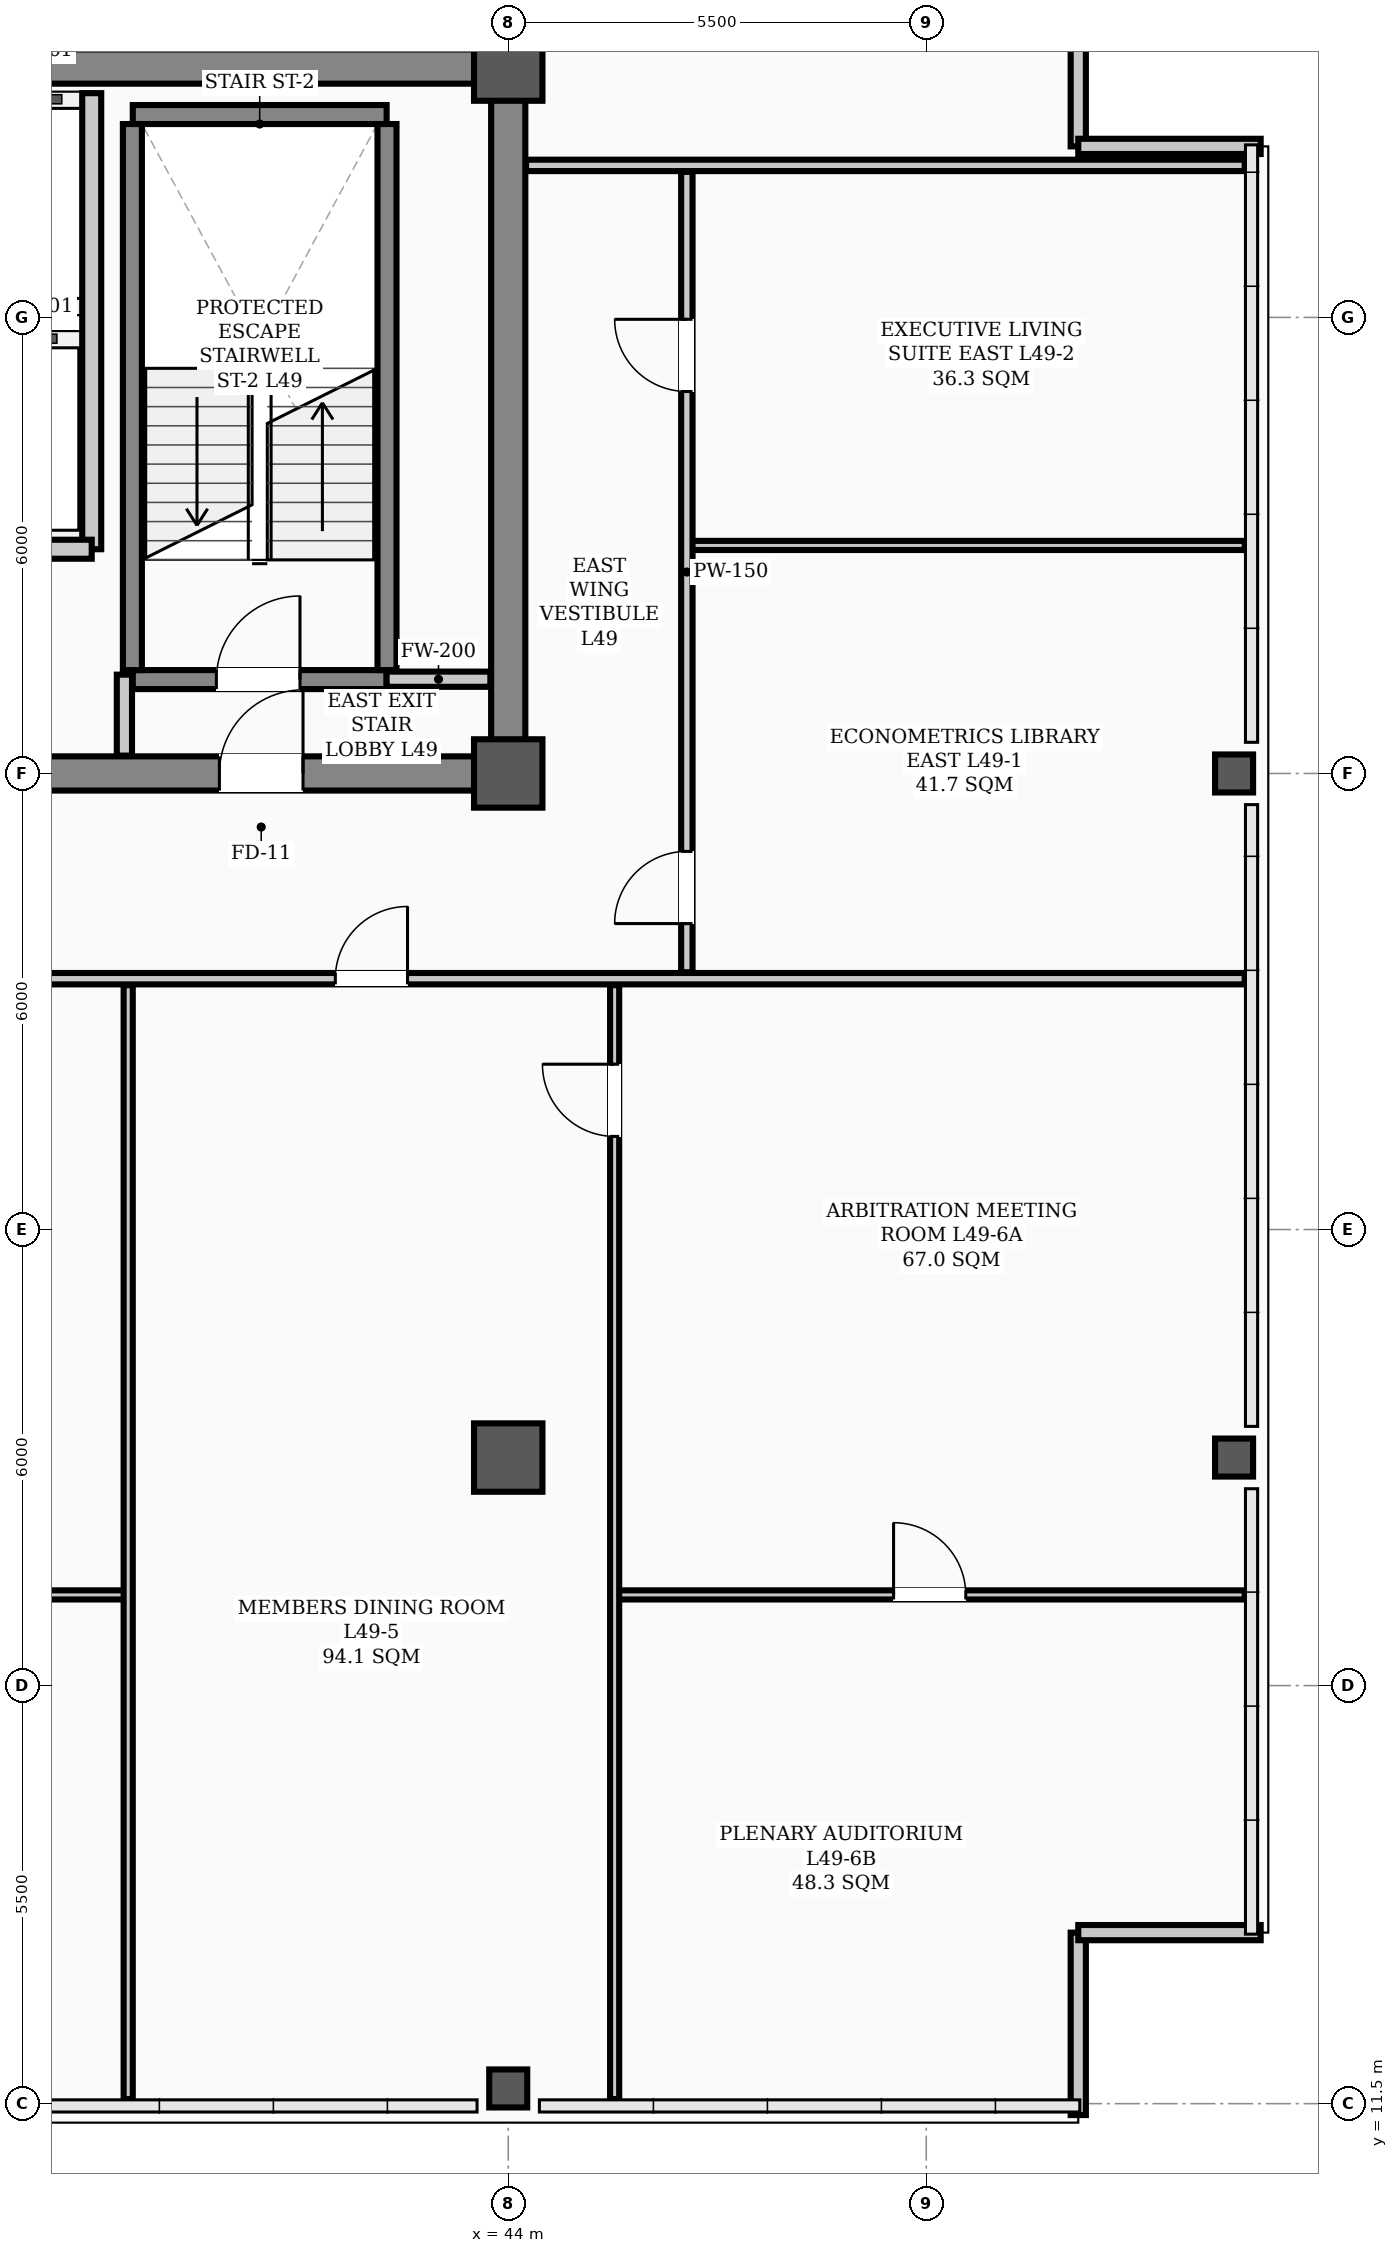
"""IFC4 building model, lengths in metres.
Left out: names, types, materials, properties, quantities, classifications, styles, units other than length and angle.
Written with IfcOpenShell. Run it as: python <this file> out.ifc"""

import sys

from ifc_helpers import new_model, si_unit, direction, frame, frame_2d, origin, origin_2d, place, context, subcontext, project, spatial, rectangle, hollow_rectangle, extrude, element, fill, save


model = new_model("IFC4")
c1 = context("Model", 3, precision=1e-05, world=origin(), true_north=direction((0.0, 1.0)))
c2 = subcontext(c1, "Body", "Model", "MODEL_VIEW")
j1 = project(units=[si_unit("LENGTHUNIT", "METRE"), si_unit("PLANEANGLEUNIT", "RADIAN")], contexts=[c1])
p1 = place(None, origin())
s1 = spatial("IfcSite", under=j1, at=p1, CompositionType="ELEMENT")
p2 = place(p1, origin())
s2 = spatial("IfcBuilding", under=s1, at=p2, CompositionType="ELEMENT")
p3 = place(p2, frame((0.0, 0.0, 196.8)))
s3 = spatial("IfcBuildingStorey", under=s2, at=p3, CompositionType="ELEMENT", Elevation=196.8)
for number, where, z_axis, x_axis in (
    (1, (44.0, 29.0, 0.0), (0.0, 0.0, 1.0), (1.0, 0.0, 0.0)),
    (2, (44.0, 38.3, 0.0), (0.0, 0.0, 1.0), (1.0, 0.0, 0.0)),
    (3, (44.0, 20.0, 0.0), (0.0, 0.0, 1.0), (1.0, 0.0, 0.0)),
):
    element("IfcColumn", number, at=place(p3, frame(where, z_axis=z_axis, x_axis=x_axis)), inside=s3, PredefinedType="COLUMN", context=c2, shape_type="SweptSolid", body=[
        extrude(hollow_rectangle(XDim=0.9, YDim=0.9, WallThickness=0.035, InnerFilletRadius=0.017, OuterFilletRadius=0.052, at=origin_2d()), origin(), (0.0, 0.0, 1.0), 3.9),
    ])
for number, where, z_axis, x_axis in (
    (4, (44.0, 11.7, 0.0), (0.0, 0.0, 1.0), (1.0, 0.0, 0.0)),
    (5, (53.55, 20.0, 0.0), (0.0, 0.0, 1.0), (1.0, 0.0, 0.0)),
    (6, (53.55, 29.0, 0.0), (0.0, 0.0, 1.0), (1.0, 0.0, 0.0)),
):
    element("IfcColumn", number, at=place(p3, frame(where, z_axis=z_axis, x_axis=x_axis)), inside=s3, PredefinedType="COLUMN", context=c2, shape_type="SweptSolid", body=[
        extrude(hollow_rectangle(XDim=0.5, YDim=0.5, WallThickness=0.024, InnerFilletRadius=0.012, OuterFilletRadius=0.036, at=origin_2d()), origin(), (0.0, 0.0, 1.0), 3.9),
    ])
for number, where, z_axis, x_axis in (
    (7, (51.5, 11.35, 0.0), (0.0, 0.0, 1.0), (0.0, 1.0, 0.0)),
    (8, (51.5, 13.75, 0.0), (0.0, 0.0, 1.0), (1.0, 0.0, 0.0)),
    (9, (51.5, 39.65, 0.0), (0.0, 0.0, 1.0), (0.0, -1.0, 0.0)),
    (10, (51.5, 37.25, 0.0), (0.0, 0.0, 1.0), (1.0, 0.0, 0.0)),
):
    element("IfcWall", number, at=place(p3, frame(where, z_axis=z_axis, x_axis=x_axis)), inside=s3, PredefinedType="PARAPET", context=c2, shape_type="SweptSolid", body=[
        extrude(rectangle(XDim=2.4, YDim=0.2, at=frame_2d((1.2, 0.0))), origin(), (0.0, 0.0, 1.0), 1.2),
    ])
p4 = place(p3, frame((13.5, 29.0, 0.0), z_axis=(0.0, 0.0, 1.0), x_axis=(1.0, 0.0, 0.0)))
e11 = element("IfcWall", 11, at=p4, inside=s3, PredefinedType="SHEAR", context=c2, shape_type="SweptSolid", body=[
    extrude(rectangle(XDim=30.5, YDim=0.45, at=frame_2d((15.25, 0.0))), origin(), (0.0, 0.0, 1.0), 3.6),
])
p5 = place(p4, frame((1.75, 0.0, 0.0)))
e12 = element("IfcOpeningElement", 12, at=p5, cuts=e11, PredefinedType="OPENING", context=c2, shape_type="SweptSolid", body=[
    extrude(rectangle(XDim=1.1, YDim=2.08, at=frame_2d((0.55, 1.04))), frame((0.0, 0.235, 0.0), z_axis=(0.0, -1.0, 0.0), x_axis=(1.0, 0.0, 0.0)), (0.0, 0.0, 1.0), 0.47),
])
p6 = place(p4, frame((26.7, 0.0, 0.0)))
e13 = element("IfcOpeningElement", 13, at=p6, cuts=e11, PredefinedType="OPENING", context=c2, shape_type="SweptSolid", body=[
    extrude(rectangle(XDim=1.1, YDim=2.08, at=frame_2d((0.55, 1.04))), frame((0.0, 0.235, 0.0), z_axis=(0.0, -1.0, 0.0), x_axis=(1.0, 0.0, 0.0)), (0.0, 0.0, 1.0), 0.47),
])
p7 = place(p4, frame((6.8, 0.0, 0.0)))
e14 = element("IfcOpeningElement", 14, at=p7, cuts=e11, PredefinedType="OPENING", context=c2, shape_type="SweptSolid", body=[
    extrude(rectangle(XDim=1.1, YDim=2.08, at=frame_2d((0.55, 1.04))), frame((0.0, 0.235, 0.0), z_axis=(0.0, -1.0, 0.0), x_axis=(1.0, 0.0, 0.0)), (0.0, 0.0, 1.0), 0.47),
])
p8 = place(p4, frame((13.2, 0.0, 0.0)))
e15 = element("IfcOpeningElement", 15, at=p8, cuts=e11, PredefinedType="OPENING", context=c2, shape_type="SweptSolid", body=[
    extrude(rectangle(XDim=1.6, YDim=2.08, at=frame_2d((0.8, 1.04))), frame((0.0, 0.235, 0.0), z_axis=(0.0, -1.0, 0.0), x_axis=(1.0, 0.0, 0.0)), (0.0, 0.0, 1.0), 0.47),
])
p9 = place(p4, frame((19.5, 0.0, 0.0)))
e16 = element("IfcOpeningElement", 16, at=p9, cuts=e11, PredefinedType="OPENING", context=c2, shape_type="SweptSolid", body=[
    extrude(rectangle(XDim=0.9, YDim=2.08, at=frame_2d((0.45, 1.04))), frame((0.0, 0.235, 0.0), z_axis=(0.0, -1.0, 0.0), x_axis=(1.0, 0.0, 0.0)), (0.0, 0.0, 1.0), 0.47),
])
p10 = place(p4, frame((21.55, 0.0, 0.0)))
e17 = element("IfcOpeningElement", 17, at=p10, cuts=e11, PredefinedType="OPENING", context=c2, shape_type="SweptSolid", body=[
    extrude(rectangle(XDim=0.9, YDim=2.08, at=frame_2d((0.45, 1.04))), frame((0.0, 0.235, 0.0), z_axis=(0.0, -1.0, 0.0), x_axis=(1.0, 0.0, 0.0)), (0.0, 0.0, 1.0), 0.47),
])
p11 = place(p3, frame((13.5, 38.3, 0.0), z_axis=(0.0, 0.0, 1.0), x_axis=(1.0, 0.0, 0.0)))
e18 = element("IfcWall", 18, at=p11, inside=s3, PredefinedType="SHEAR", context=c2, shape_type="SweptSolid", body=[
    extrude(rectangle(XDim=30.5, YDim=0.45, at=frame_2d((15.25, 0.0))), origin(), (0.0, 0.0, 1.0), 3.6),
])
p12 = place(p3, frame((44.0, 29.35, 0.0), z_axis=(0.0, 0.0, 1.0), x_axis=(0.0, 1.0, 0.0)))
e19 = element("IfcWall", 19, at=p12, inside=s3, PredefinedType="SHEAR", context=c2, shape_type="SweptSolid", body=[
    extrude(rectangle(XDim=8.6, YDim=0.45, at=frame_2d((4.3, 0.0))), origin(), (0.0, 0.0, 1.0), 3.6),
])
p13 = place(p3, frame((39.06, 30.235, 0.0), z_axis=(0.0, 0.0, 1.0), x_axis=(1.0, 0.0, 0.0)))
e20 = element("IfcWall", 20, at=p13, inside=s3, PredefinedType="STANDARD", context=c2, shape_type="SweptSolid", body=[
    extrude(rectangle(XDim=3.34, YDim=0.25, at=frame_2d((1.67, 0.0))), origin(), (0.0, 0.0, 1.0), 3.6),
])
p14 = place(p13, frame((1.1, 0.0, 0.0)))
e21 = element("IfcOpeningElement", 21, at=p14, cuts=e20, PredefinedType="OPENING", context=c2, shape_type="SweptSolid", body=[
    extrude(rectangle(XDim=1.1, YDim=2.08, at=frame_2d((0.55, 1.04))), frame((0.0, 0.135, 0.0), z_axis=(0.0, -1.0, 0.0), x_axis=(1.0, 0.0, 0.0)), (0.0, 0.0, 1.0), 0.27),
])
p15 = place(p3, frame((39.06, 37.669, 0.0), z_axis=(0.0, 0.0, 1.0), x_axis=(1.0, 0.0, 0.0)))
e22 = element("IfcWall", 22, at=p15, inside=s3, PredefinedType="STANDARD", context=c2, shape_type="SweptSolid", body=[
    extrude(rectangle(XDim=3.34, YDim=0.25, at=frame_2d((1.67, 0.0))), origin(), (0.0, 0.0, 1.0), 3.6),
])
for number, where, z_axis, x_axis in (
    (23, (39.055, 30.36, 0.0), (0.0, 0.0, 1.0), (0.0, 1.0, 0.0)),
    (24, (42.405, 30.36, 0.0), (0.0, 0.0, 1.0), (0.0, 1.0, 0.0)),
):
    element("IfcWall", number, at=place(p3, frame(where, z_axis=z_axis, x_axis=x_axis)), inside=s3, PredefinedType="STANDARD", context=c2, shape_type="SweptSolid", body=[
        extrude(rectangle(XDim=7.184, YDim=0.25, at=frame_2d((3.592, 0.0))), origin(), (0.0, 0.0, 1.0), 3.6),
    ])
p16 = place(p3, frame((38.52, 31.95, 0.0), z_axis=(0.0, 0.0, 1.0), x_axis=(0.0, 1.0, 0.0)))
e25 = element("IfcWall", 25, at=p16, inside=s3, PredefinedType="STANDARD", context=c2, shape_type="SweptSolid", body=[
    extrude(rectangle(XDim=6.0, YDim=0.25, at=frame_2d((3.0, 0.0))), origin(), (0.0, 0.0, 1.0), 2.18),
])
p17 = place(p3, frame((36.62, 31.95, 0.0), z_axis=(0.0, 0.0, 1.0), x_axis=(1.0, 0.0, 0.0)))
e26 = element("IfcWall", 26, at=p17, inside=s3, PredefinedType="STANDARD", context=c2, shape_type="SweptSolid", body=[
    extrude(rectangle(XDim=1.9, YDim=0.25, at=frame_2d((0.95, 0.0))), origin(), (0.0, 0.0, 1.0), 3.48),
])
p18 = place(p3, frame((42.4, 30.24, 0.0), z_axis=(0.0, 0.0, 1.0), x_axis=(1.0, 0.0, 0.0)))
e27 = element("IfcWall", 27, at=p18, inside=s3, PredefinedType="STANDARD", context=c2, shape_type="SweptSolid", body=[
    extrude(rectangle(XDim=1.365, YDim=0.2, at=frame_2d((0.683, 0.0))), origin(), (0.0, 0.0, 1.0), 2.18),
])
p19 = place(p3, frame((10.31, 26.3, 0.0), z_axis=(0.0, 0.0, 1.0), x_axis=(1.0, 0.0, 0.0)))
e28 = element("IfcWall", 28, at=p19, inside=s3, PredefinedType="PARTITIONING", context=c2, shape_type="SweptSolid", body=[
    extrude(rectangle(XDim=43.38, YDim=0.15, at=frame_2d((21.69, 0.0))), origin(), (0.0, 0.0, 1.0), 2.18),
])
p20 = place(p19, frame((4.47, 0.0, 0.0)))
e29 = element("IfcOpeningElement", 29, at=p20, cuts=e28, PredefinedType="OPENING", context=c2, shape_type="SweptSolid", body=[
    extrude(rectangle(XDim=0.95, YDim=2.08, at=frame_2d((0.475, 1.04))), frame((0.0, 0.085, 0.0), z_axis=(0.0, -1.0, 0.0), x_axis=(1.0, 0.0, 0.0)), (0.0, 0.0, 1.0), 0.17),
])
p21 = place(p19, frame((10.815, 0.0, 0.0)))
e30 = element("IfcOpeningElement", 30, at=p21, cuts=e28, PredefinedType="OPENING", context=c2, shape_type="SweptSolid", body=[
    extrude(rectangle(XDim=0.95, YDim=2.08, at=frame_2d((0.475, 1.04))), frame((0.0, 0.085, 0.0), z_axis=(0.0, -1.0, 0.0), x_axis=(1.0, 0.0, 0.0)), (0.0, 0.0, 1.0), 0.17),
])
p22 = place(p19, frame((17.715, 0.0, 0.0)))
e31 = element("IfcOpeningElement", 31, at=p22, cuts=e28, PredefinedType="OPENING", context=c2, shape_type="SweptSolid", body=[
    extrude(rectangle(XDim=0.95, YDim=2.08, at=frame_2d((0.475, 1.04))), frame((0.0, 0.085, 0.0), z_axis=(0.0, -1.0, 0.0), x_axis=(1.0, 0.0, 0.0)), (0.0, 0.0, 1.0), 0.17),
])
p23 = place(p19, frame((24.815, 0.0, 0.0)))
e32 = element("IfcOpeningElement", 32, at=p23, cuts=e28, PredefinedType="OPENING", context=c2, shape_type="SweptSolid", body=[
    extrude(rectangle(XDim=0.95, YDim=2.08, at=frame_2d((0.475, 1.04))), frame((0.0, 0.085, 0.0), z_axis=(0.0, -1.0, 0.0), x_axis=(1.0, 0.0, 0.0)), (0.0, 0.0, 1.0), 0.17),
])
p24 = place(p19, frame((31.415, 0.0, 0.0)))
e33 = element("IfcOpeningElement", 33, at=p24, cuts=e28, PredefinedType="OPENING", context=c2, shape_type="SweptSolid", body=[
    extrude(rectangle(XDim=0.95, YDim=2.08, at=frame_2d((0.475, 1.04))), frame((0.0, 0.085, 0.0), z_axis=(0.0, -1.0, 0.0), x_axis=(1.0, 0.0, 0.0)), (0.0, 0.0, 1.0), 0.17),
])
p25 = place(p3, frame((44.235, 37.0, 0.0), z_axis=(0.0, 0.0, 1.0), x_axis=(1.0, 0.0, 0.0)))
e34 = element("IfcWall", 34, at=p25, inside=s3, PredefinedType="PARTITIONING", context=c2, shape_type="SweptSolid", body=[
    extrude(rectangle(XDim=9.455, YDim=0.15, at=frame_2d((4.728, 0.0))), origin(), (0.0, 0.0, 1.0), 2.18),
])
p26 = place(p3, frame((32.2, 18.193, 0.0), z_axis=(0.0, 0.0, 1.0), x_axis=(1.0, 0.0, 0.0)))
e35 = element("IfcWall", 35, at=p26, inside=s3, PredefinedType="PARTITIONING", context=c2, shape_type="SweptSolid", body=[
    extrude(rectangle(XDim=6.8, YDim=0.12, at=frame_2d((3.4, 0.0))), origin(), (0.0, 0.0, 1.0), 2.18),
])
p27 = place(p26, frame((2.925, 0.0, 0.0)))
e36 = element("IfcOpeningElement", 36, at=p27, cuts=e35, PredefinedType="OPENING", context=c2, shape_type="SweptSolid", body=[
    extrude(rectangle(XDim=0.95, YDim=2.08, at=frame_2d((0.475, 1.04))), frame((0.0, 0.07, 0.0), z_axis=(0.0, -1.0, 0.0), x_axis=(1.0, 0.0, 0.0)), (0.0, 0.0, 1.0), 0.14),
])
p28 = place(p3, frame((45.4, 18.193, 0.0), z_axis=(0.0, 0.0, 1.0), x_axis=(1.0, 0.0, 0.0)))
e37 = element("IfcWall", 37, at=p28, inside=s3, PredefinedType="PARTITIONING", context=c2, shape_type="SweptSolid", body=[
    extrude(rectangle(XDim=8.29, YDim=0.12, at=frame_2d((4.145, 0.0))), origin(), (0.0, 0.0, 1.0), 3.6),
])
p29 = place(p28, frame((3.67, 0.0, 0.0)))
e38 = element("IfcOpeningElement", 38, at=p29, cuts=e37, PredefinedType="OPENING", context=c2, shape_type="SweptSolid", body=[
    extrude(rectangle(XDim=0.95, YDim=2.08, at=frame_2d((0.475, 1.04))), frame((0.0, 0.07, 0.0), z_axis=(0.0, -1.0, 0.0), x_axis=(1.0, 0.0, 0.0)), (0.0, 0.0, 1.0), 0.14),
])
p30 = place(p3, frame((46.35, 32.0, 0.0), z_axis=(0.0, 0.0, 1.0), x_axis=(1.0, 0.0, 0.0)))
e39 = element("IfcWall", 39, at=p30, inside=s3, PredefinedType="PARTITIONING", context=c2, shape_type="SweptSolid", body=[
    extrude(rectangle(XDim=7.34, YDim=0.12, at=frame_2d((3.67, 0.0))), origin(), (0.0, 0.0, 1.0), 3.6),
])
p31 = place(p3, frame((38.95, 29.235, 0.0), z_axis=(0.0, 0.0, 1.0), x_axis=(0.0, 1.0, 0.0)))
e40 = element("IfcWall", 40, at=p31, inside=s3, PredefinedType="STANDARD", context=c2, shape_type="SweptSolid", body=[
    extrude(rectangle(XDim=1.065, YDim=0.2, at=frame_2d((0.532, 0.0))), origin(), (0.0, 0.0, 1.0), 2.18),
])
p32 = place(p3, frame((46.35, 26.385, 0.0), z_axis=(0.0, 0.0, 1.0), x_axis=(0.0, 1.0, 0.0)))
e41 = element("IfcWall", 41, at=p32, inside=s3, PredefinedType="PARTITIONING", context=c2, shape_type="SweptSolid", body=[
    extrude(rectangle(XDim=10.53, YDim=0.15, at=frame_2d((5.265, 0.0))), origin(), (0.0, 0.0, 1.0), 2.18),
])
p33 = place(p32, frame((0.64, 0.0, 0.0)))
e42 = element("IfcOpeningElement", 42, at=p33, cuts=e41, PredefinedType="OPENING", context=c2, shape_type="SweptSolid", body=[
    extrude(rectangle(XDim=0.95, YDim=2.08, at=frame_2d((0.475, 1.04))), frame((0.0, 0.085, 0.0), z_axis=(0.0, -1.0, 0.0), x_axis=(1.0, 0.0, 0.0)), (0.0, 0.0, 1.0), 0.17),
])
p34 = place(p32, frame((7.64, 0.0, 0.0)))
e43 = element("IfcOpeningElement", 43, at=p34, cuts=e41, PredefinedType="OPENING", context=c2, shape_type="SweptSolid", body=[
    extrude(rectangle(XDim=0.95, YDim=2.08, at=frame_2d((0.475, 1.04))), frame((0.0, 0.085, 0.0), z_axis=(0.0, -1.0, 0.0), x_axis=(1.0, 0.0, 0.0)), (0.0, 0.0, 1.0), 0.17),
])
p35 = place(p3, frame((39.0, 11.56, 0.0), z_axis=(0.0, 0.0, 1.0), x_axis=(0.0, 1.0, 0.0)))
e44 = element("IfcWall", 44, at=p35, inside=s3, PredefinedType="PARTITIONING", context=c2, shape_type="SweptSolid", body=[
    extrude(rectangle(XDim=14.655, YDim=0.12, at=frame_2d((7.328, 0.0))), origin(), (0.0, 0.0, 1.0), 2.18),
])
p36 = place(p3, frame((45.4, 11.56, 0.0), z_axis=(0.0, 0.0, 1.0), x_axis=(0.0, 1.0, 0.0)))
e45 = element("IfcWall", 45, at=p36, inside=s3, PredefinedType="PARTITIONING", context=c2, shape_type="SweptSolid", body=[
    extrude(rectangle(XDim=14.655, YDim=0.12, at=frame_2d((7.328, 0.0))), origin(), (0.0, 0.0, 1.0), 2.18),
])
p37 = place(p36, frame((12.665, 0.0, 0.0)))
e46 = element("IfcOpeningElement", 46, at=p37, cuts=e45, PredefinedType="OPENING", context=c2, shape_type="SweptSolid", body=[
    extrude(rectangle(XDim=0.95, YDim=2.08, at=frame_2d((0.475, 1.04))), frame((0.0, 0.07, 0.0), z_axis=(0.0, -1.0, 0.0), x_axis=(1.0, 0.0, 0.0)), (0.0, 0.0, 1.0), 0.14),
])
p38 = place(p14, origin())
e47 = element("IfcDoor", 47, at=p38, inside=s3, OperationType="SINGLE_SWING_RIGHT", PredefinedType="DOOR", context=c2, shape_type="SweptSolid", body=[
    extrude(rectangle(XDim=1.1, YDim=2.08, at=frame_2d((0.55, 1.04))), frame((0.0, 0.025, 0.0), z_axis=(0.0, -1.0, 0.0), x_axis=(1.0, 0.0, 0.0)), (0.0, 0.0, 1.0), 0.05),
])
fill(e21, e47)
p39 = place(p6, origin())
e48 = element("IfcDoor", 48, at=p39, inside=s3, OperationType="SINGLE_SWING_RIGHT", PredefinedType="DOOR", context=c2, shape_type="SweptSolid", body=[
    extrude(rectangle(XDim=1.1, YDim=2.08, at=frame_2d((0.55, 1.04))), frame((0.0, 0.025, 0.0), z_axis=(0.0, -1.0, 0.0), x_axis=(1.0, 0.0, 0.0)), (0.0, 0.0, 1.0), 0.05),
])
fill(e13, e48)
p40 = place(p24, origin())
e49 = element("IfcDoor", 49, at=p40, inside=s3, OperationType="SINGLE_SWING_RIGHT", PredefinedType="DOOR", context=c2, shape_type="SweptSolid", body=[
    extrude(rectangle(XDim=0.95, YDim=2.08, at=frame_2d((0.475, 1.04))), frame((0.0, 0.025, 0.0), z_axis=(0.0, -1.0, 0.0), x_axis=(1.0, 0.0, 0.0)), (0.0, 0.0, 1.0), 0.05),
])
fill(e33, e49)
p41 = place(p29, origin())
e50 = element("IfcDoor", 50, at=p41, inside=s3, OperationType="SINGLE_SWING_LEFT", PredefinedType="DOOR", context=c2, shape_type="SweptSolid", body=[
    extrude(rectangle(XDim=0.95, YDim=2.08, at=frame_2d((0.475, 1.04))), frame((0.0, 0.025, 0.0), z_axis=(0.0, -1.0, 0.0), x_axis=(1.0, 0.0, 0.0)), (0.0, 0.0, 1.0), 0.05),
])
fill(e38, e50)
p42 = place(p37, origin())
e51 = element("IfcDoor", 51, at=p42, inside=s3, OperationType="SINGLE_SWING_RIGHT", PredefinedType="DOOR", context=c2, shape_type="SweptSolid", body=[
    extrude(rectangle(XDim=0.95, YDim=2.08, at=frame_2d((0.475, 1.04))), frame((0.0, 0.025, 0.0), z_axis=(0.0, -1.0, 0.0), x_axis=(1.0, 0.0, 0.0)), (0.0, 0.0, 1.0), 0.05),
])
fill(e46, e51)
p43 = place(p33, origin())
e52 = element("IfcDoor", 52, at=p43, inside=s3, OperationType="SINGLE_SWING_LEFT", PredefinedType="DOOR", context=c2, shape_type="SweptSolid", body=[
    extrude(rectangle(XDim=0.95, YDim=2.08, at=frame_2d((0.475, 1.04))), frame((0.0, 0.025, 0.0), z_axis=(0.0, -1.0, 0.0), x_axis=(1.0, 0.0, 0.0)), (0.0, 0.0, 1.0), 0.05),
])
fill(e42, e52)
p44 = place(p34, origin())
e53 = element("IfcDoor", 53, at=p44, inside=s3, OperationType="SINGLE_SWING_RIGHT", PredefinedType="DOOR", context=c2, shape_type="SweptSolid", body=[
    extrude(rectangle(XDim=0.95, YDim=2.08, at=frame_2d((0.475, 1.04))), frame((0.0, 0.025, 0.0), z_axis=(0.0, -1.0, 0.0), x_axis=(1.0, 0.0, 0.0)), (0.0, 0.0, 1.0), 0.05),
])
fill(e43, e53)
save(model, sys.argv[1])
